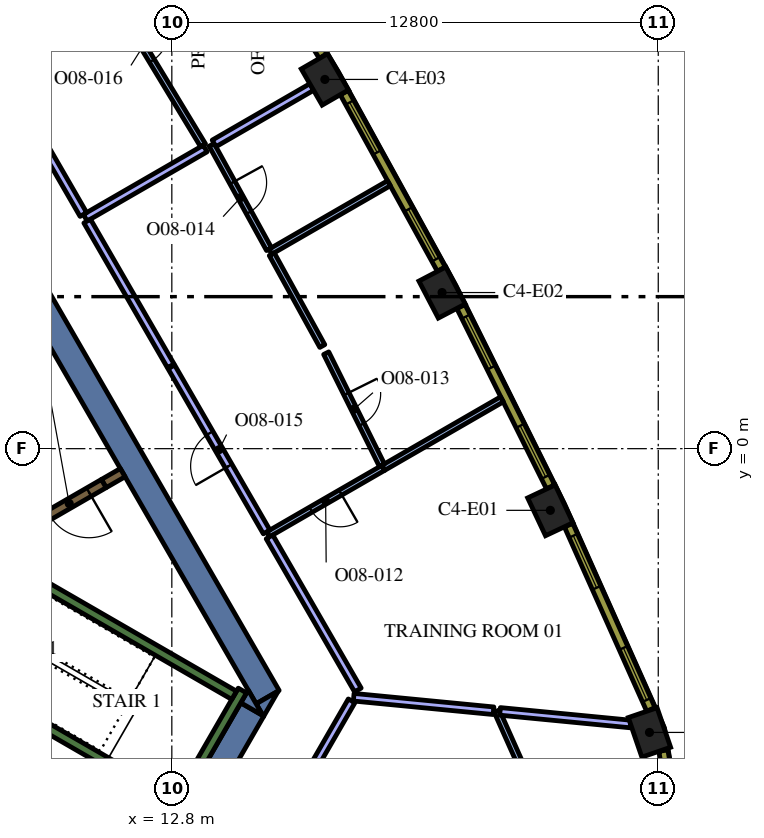
"""IFC4 building model, lengths in metres.
Left out: names, types, materials, properties, quantities, classifications, styles, units other than length and angle.
Written with IfcOpenShell. Run it as: python <this file> out.ifc"""

import sys

from ifc_helpers import new_model, si_unit, direction, frame, frame_2d, origin, origin_2d, place, context, subcontext, project, spatial, polyline, rectangle, outline, extrude, element, fill, save


model = new_model("IFC4")
c1 = context("Model", 3, precision=1e-05, world=origin(), true_north=direction((0.0, 1.0)))
c2 = subcontext(c1, "Body", "Model", "MODEL_VIEW")
j1 = project(units=[si_unit("LENGTHUNIT", "METRE"), si_unit("PLANEANGLEUNIT", "RADIAN")], contexts=[c1])
p1 = place(None, origin())
s1 = spatial("IfcSite", under=j1, at=p1, CompositionType="ELEMENT")
p2 = place(p1, origin())
s2 = spatial("IfcBuilding", under=s1, at=p2, CompositionType="ELEMENT")
p3 = place(p2, frame((0.0, 0.0, 226.8)))
s3 = spatial("IfcBuildingStorey", under=s2, at=p3, CompositionType="ELEMENT", Elevation=226.8)
for number, where, z_axis, x_axis in (
    (1, (25.369, -7.466, 0.0), (0.0, 0.0, 1.0), (-0.324, 0.946, 0.0)),
    (2, (22.76, -1.623, 0.0), (0.0, 0.0, 1.0), (-0.426, 0.905, 0.0)),
    (3, (19.912, 4.108, 0.0), (0.0, 0.0, 1.0), (-0.464, 0.886, 0.0)),
    (4, (16.827, 9.715, 0.0), (0.0, 0.0, 1.0), (-0.5, 0.866, 0.0)),
):
    element("IfcColumn", number, at=place(p3, frame(where, z_axis=z_axis, x_axis=x_axis)), inside=s3, PredefinedType="COLUMN", context=c2, shape_type="SweptSolid", body=[
        extrude(rectangle(XDim=1.1, YDim=0.8, at=origin_2d()), origin(), (0.0, 0.0, 1.0), 4.2),
    ])
p4 = place(p3, frame((9.085, 4.264, 0.0), z_axis=(0.0, 0.0, 1.0), x_axis=(0.499998082512, -0.866026510844, 0.0)))
e5 = element("IfcWall", 5, at=p4, inside=s3, PredefinedType="SOLIDWALL", context=c2, shape_type="SweptSolid", body=[
    extrude(rectangle(XDim=12.472, YDim=0.7, at=frame_2d((6.236, 0.0))), origin(), (0.0, 0.0, 1.0), 4.2),
])
p5 = place(p3, origin())
e6 = element("IfcWall", 6, at=p5, inside=s3, PredefinedType="SOLIDWALL", context=c2, shape_type="SweptSolid", body=[
    extrude(outline(polyline([(15.213, -7.05), (15.019, -6.714), (15.601, -6.378), (15.213, -7.05)])), origin(), (0.0, 0.0, 1.0), 4.2),
])
p6 = place(p3, frame((13.003, -10.179, 0.0), z_axis=(0.0, 0.0, 1.0), x_axis=(0.499972675833, 0.866041178825, 0.0)))
e7 = element("IfcWall", 7, at=p6, inside=s3, PredefinedType="SOLIDWALL", context=c2, shape_type="SweptSolid", body=[
    extrude(rectangle(XDim=3.829, YDim=0.7, at=frame_2d((1.915, 0.0))), origin(), (0.0, 0.0, 1.0), 4.2),
])
e8 = element("IfcWall", 8, at=p5, inside=s3, PredefinedType="SOLIDWALL", context=c2, shape_type="SweptSolid", body=[
    extrude(outline(polyline([(14.809, -6.35), (15.197, -7.022), (14.615, -6.686), (14.809, -6.35)])), origin(), (0.0, 0.0, 1.0), 4.2),
])
p7 = place(p3, frame((12.84, -9.511, 0.0), z_axis=(0.0, 0.0, 1.0), x_axis=(0.500048121057, 0.865997619297, 0.0)))
e9 = element("IfcWall", 9, at=p7, inside=s3, PredefinedType="SOLIDWALL", context=c2, shape_type="SweptSolid", body=[
    extrude(rectangle(XDim=3.634, YDim=0.25, at=frame_2d((1.817, 0.0))), origin(), (0.0, 0.0, 1.0), 4.2),
])
p8 = place(p3, frame((12.84, -9.261, 0.0), z_axis=(0.0, 0.0, 1.0), x_axis=(-0.866013990052, 0.500019768644, 0.0)))
e10 = element("IfcWall", 10, at=p8, inside=s3, PredefinedType="SOLIDWALL", context=c2, shape_type="SweptSolid", body=[
    extrude(rectangle(XDim=6.8, YDim=0.25, at=frame_2d((3.4, 0.0))), origin(), (0.0, 0.0, 1.0), 4.2),
])
p9 = place(p3, frame((8.334, -2.964, 0.0), z_axis=(0.0, 0.0, 1.0), x_axis=(0.866016039709, -0.500016218704, 0.0)))
e11 = element("IfcWall", 11, at=p9, inside=s3, PredefinedType="SOLIDWALL", context=c2, shape_type="SweptSolid", body=[
    extrude(rectangle(XDim=7.05, YDim=0.25, at=frame_2d((3.525, 0.0))), origin(), (0.0, 0.0, 1.0), 4.2),
])
p10 = place(p3, frame((11.507, -0.631, 0.0), z_axis=(0.0, 0.0, 1.0), x_axis=(-0.866093731455, -0.499881634324, 0.0)))
e12 = element("IfcWall", 12, at=p10, inside=s3, PredefinedType="SOLIDWALL", context=c2, shape_type="SweptSolid", body=[
    extrude(rectangle(XDim=0.575, YDim=0.25, at=frame_2d((0.288, 0.0))), origin(), (0.0, 0.0, 1.0), 4.2),
])
p11 = place(p3, frame((11.009, -0.919, 0.0), z_axis=(0.0, 0.0, 1.0), x_axis=(-0.866059744384, -0.49994051562, 0.0)))
e13 = element("IfcWall", 13, at=p11, inside=s3, PredefinedType="SOLIDWALL", context=c2, shape_type="SweptSolid", body=[
    extrude(rectangle(XDim=2.1, YDim=0.25, at=frame_2d((1.05, 0.0))), origin(), (0.0, 0.0, 1.0), 4.2),
])
p12 = place(p11, frame((0.45, 0.0, 0.0)))
e14 = element("IfcOpeningElement", 14, at=p12, cuts=e13, PredefinedType="OPENING", context=c2, shape_type="SweptSolid", body=[
    extrude(rectangle(XDim=1.2, YDim=2.1, at=frame_2d((0.6, 1.05))), frame((0.0, 0.135, 0.0), z_axis=(0.0, -1.0, 0.0), x_axis=(1.0, 0.0, 0.0)), (0.0, 0.0, 1.0), 0.27),
])
p13 = place(p3, frame((21.963, -8.276, 0.0), z_axis=(0.0, 0.0, 1.0), x_axis=(-0.407510458183, 0.913200540118, 0.0)))
e15 = element("IfcWall", 15, at=p13, inside=s3, PredefinedType="PARTITIONING", context=c2, shape_type="SweptSolid", body=[
    extrude(rectangle(XDim=1.502, YDim=0.15, at=frame_2d((0.751, 0.0))), origin(), (0.0, 0.0, 1.0), 3.45),
])
p14 = place(p3, frame((21.437, -6.913, 0.0), z_axis=(0.0, 0.0, 1.0), x_axis=(0.995357015301, -0.096251816042, 0.0)))
e16 = element("IfcWall", 16, at=p14, inside=s3, PredefinedType="PARTITIONING", context=c2, shape_type="SweptSolid", body=[
    extrude(rectangle(XDim=3.45, YDim=0.2, at=frame_2d((1.725, 0.0))), origin(), (0.0, 0.0, 1.0), 3.45),
])
p15 = place(p3, frame((17.586, -6.54, 0.0), z_axis=(0.0, 0.0, 1.0), x_axis=(0.995358181524, -0.096239755158, 0.0)))
e17 = element("IfcWall", 17, at=p15, inside=s3, PredefinedType="PARTITIONING", context=c2, shape_type="SweptSolid", body=[
    extrude(rectangle(XDim=3.696, YDim=0.2, at=frame_2d((1.848, 0.0))), origin(), (0.0, 0.0, 1.0), 3.45),
])
p16 = place(p3, frame((14.362, -12.124, 0.0), z_axis=(0.0, 0.0, 1.0), x_axis=(0.500017005442, 0.866015585465, 0.0)))
e18 = element("IfcWall", 18, at=p16, inside=s3, PredefinedType="PARTITIONING", context=c2, shape_type="SweptSolid", body=[
    extrude(rectangle(XDim=6.338, YDim=0.2, at=frame_2d((3.169, 0.0))), origin(), (0.0, 0.0, 1.0), 3.45),
])
p17 = place(p3, frame((18.36, -0.508, 0.0), z_axis=(0.0, 0.0, 1.0), x_axis=(0.866033589339, 0.499985821935, 0.0)))
e19 = element("IfcWall", 19, at=p17, inside=s3, PredefinedType="PARTITIONING", context=c2, shape_type="SweptSolid", body=[
    extrude(rectangle(XDim=3.611, YDim=0.15, at=frame_2d((1.805, 0.0))), origin(), (0.0, 0.0, 1.0), 3.45),
])
p18 = place(p3, frame((18.367, -0.504, 0.0), z_axis=(0.0, 0.0, 1.0), x_axis=(-0.866056812483, -0.499945594592, 0.0)))
e20 = element("IfcWall", 20, at=p18, inside=s3, PredefinedType="PARTITIONING", context=c2, shape_type="SweptSolid", body=[
    extrude(rectangle(XDim=3.504, YDim=0.15, at=frame_2d((1.752, 0.0))), origin(), (0.0, 0.0, 1.0), 3.45),
])
p19 = place(p18, frame((1.304, 0.0, 0.0)))
e21 = element("IfcOpeningElement", 21, at=p19, cuts=e20, PredefinedType="OPENING", context=c2, shape_type="SweptSolid", body=[
    extrude(rectangle(XDim=0.9, YDim=2.1, at=frame_2d((0.45, 1.05))), frame((0.0, 0.085, 0.0), z_axis=(0.0, -1.0, 0.0), x_axis=(1.0, 0.0, 0.0)), (0.0, 0.0, 1.0), 0.17),
])
p20 = place(p3, frame((17.696, -6.35, 0.0), z_axis=(0.0, 0.0, 1.0), x_axis=(-0.499976825411, 0.866038783226, 0.0)))
e22 = element("IfcWall", 22, at=p20, inside=s3, PredefinedType="PARTITIONING", context=c2, shape_type="SweptSolid", body=[
    extrude(rectangle(XDim=4.653, YDim=0.2, at=frame_2d((2.326, 0.0))), origin(), (0.0, 0.0, 1.0), 3.45),
])
p21 = place(p3, frame((15.394, 5.183, 0.0), z_axis=(0.0, 0.0, 1.0), x_axis=(0.866039935929, 0.499974828743, 0.0)))
e23 = element("IfcWall", 23, at=p21, inside=s3, PredefinedType="PARTITIONING", context=c2, shape_type="SweptSolid", body=[
    extrude(rectangle(XDim=3.601, YDim=0.15, at=frame_2d((1.8, 0.0))), origin(), (0.0, 0.0, 1.0), 3.45),
])
p22 = place(p3, frame((16.863, 2.513, 0.0), z_axis=(0.0, 0.0, 1.0), x_axis=(0.445197589821, -0.895432357031, 0.0)))
e24 = element("IfcWall", 24, at=p22, inside=s3, PredefinedType="PARTITIONING", context=c2, shape_type="SweptSolid", body=[
    extrude(rectangle(XDim=3.296, YDim=0.15, at=frame_2d((1.648, 0.0))), origin(), (0.0, 0.0, 1.0), 3.45),
])
p23 = place(p22, frame((1.196, 0.0, 0.0)))
e25 = element("IfcOpeningElement", 25, at=p23, cuts=e24, PredefinedType="OPENING", context=c2, shape_type="SweptSolid", body=[
    extrude(rectangle(XDim=0.9, YDim=2.1, at=frame_2d((0.45, 1.05))), frame((0.0, 0.085, 0.0), z_axis=(0.0, -1.0, 0.0), x_axis=(1.0, 0.0, 0.0)), (0.0, 0.0, 1.0), 0.17),
])
p24 = place(p3, frame((16.76, 2.7, 0.0), z_axis=(0.0, 0.0, 1.0), x_axis=(-0.481888167687, 0.876232728128, 0.0)))
e26 = element("IfcWall", 26, at=p24, inside=s3, PredefinedType="PARTITIONING", context=c2, shape_type="SweptSolid", body=[
    extrude(rectangle(XDim=2.758, YDim=0.15, at=frame_2d((1.379, 0.0))), origin(), (0.0, 0.0, 1.0), 3.45),
])
p25 = place(p3, frame((13.848, 7.995, 0.0), z_axis=(0.0, 0.0, 1.0), x_axis=(0.481894826099, -0.876229066272, 0.0)))
e27 = element("IfcWall", 27, at=p25, inside=s3, PredefinedType="PARTITIONING", context=c2, shape_type="SweptSolid", body=[
    extrude(rectangle(XDim=3.134, YDim=0.15, at=frame_2d((1.567, 0.0))), origin(), (0.0, 0.0, 1.0), 3.45),
])
p26 = place(p25, frame((1.134, 0.0, 0.0)))
e28 = element("IfcOpeningElement", 28, at=p26, cuts=e27, PredefinedType="OPENING", context=c2, shape_type="SweptSolid", body=[
    extrude(rectangle(XDim=0.9, YDim=2.1, at=frame_2d((0.45, 1.05))), frame((0.0, 0.085, 0.0), z_axis=(0.0, -1.0, 0.0), x_axis=(1.0, 0.0, 0.0)), (0.0, 0.0, 1.0), 0.17),
])
p27 = place(p3, frame((13.913, 8.032, 0.0), z_axis=(0.0, 0.0, 1.0), x_axis=(0.866015594979, 0.500016988964, 0.0)))
e29 = element("IfcWall", 29, at=p27, inside=s3, PredefinedType="PARTITIONING", context=c2, shape_type="SweptSolid", body=[
    extrude(rectangle(XDim=2.966, YDim=0.2, at=frame_2d((1.483, 0.0))), origin(), (0.0, 0.0, 1.0), 3.45),
])
p28 = place(p3, frame((10.522, 6.075, 0.0), z_axis=(0.0, 0.0, 1.0), x_axis=(0.866003708037, 0.500037576254, 0.0)))
e30 = element("IfcWall", 30, at=p28, inside=s3, PredefinedType="PARTITIONING", context=c2, shape_type="SweptSolid", body=[
    extrude(rectangle(XDim=3.644, YDim=0.2, at=frame_2d((1.822, 0.0))), origin(), (0.0, 0.0, 1.0), 3.45),
])
p29 = place(p3, frame((12.772, 2.178, 0.0), z_axis=(0.0, 0.0, 1.0), x_axis=(-0.50001224981, 0.866018331238, 0.0)))
e31 = element("IfcWall", 31, at=p29, inside=s3, PredefinedType="PARTITIONING", context=c2, shape_type="SweptSolid", body=[
    extrude(rectangle(XDim=4.4, YDim=0.2, at=frame_2d((2.2, 0.0))), origin(), (0.0, 0.0, 1.0), 3.45),
])
p30 = place(p3, frame((15.295, -2.191, 0.0), z_axis=(0.0, 0.0, 1.0), x_axis=(-0.500039923732, 0.86600235258, 0.0)))
e32 = element("IfcWall", 32, at=p30, inside=s3, PredefinedType="PARTITIONING", context=c2, shape_type="SweptSolid", body=[
    extrude(rectangle(XDim=5.015, YDim=0.2, at=frame_2d((2.507, 0.0))), origin(), (0.0, 0.0, 1.0), 3.45),
])
p31 = place(p30, frame((2.0, 0.0, 0.0)))
e33 = element("IfcOpeningElement", 33, at=p31, cuts=e32, PredefinedType="OPENING", context=c2, shape_type="SweptSolid", body=[
    extrude(rectangle(XDim=1.0, YDim=2.1, at=frame_2d((0.5, 1.05))), frame((0.0, 0.11, 0.0), z_axis=(0.0, -1.0, 0.0), x_axis=(1.0, 0.0, 0.0)), (0.0, 0.0, 1.0), 0.22),
])
p32 = place(p3, frame((10.439, 13.24, 0.0), z_axis=(0.0, 0.0, 1.0), x_axis=(0.517837859082, -0.855478785068, 0.0)))
e34 = element("IfcWall", 34, at=p32, inside=s3, PredefinedType="PARTITIONING", context=c2, shape_type="SweptSolid", body=[
    extrude(rectangle(XDim=6.148, YDim=0.15, at=frame_2d((3.074, 0.0))), origin(), (0.0, 0.0, 1.0), 3.45),
])
p33 = place(p32, frame((2.648, 0.0, 0.0)))
e35 = element("IfcOpeningElement", 35, at=p33, cuts=e34, PredefinedType="OPENING", context=c2, shape_type="SweptSolid", body=[
    extrude(rectangle(XDim=0.9, YDim=2.1, at=frame_2d((0.45, 1.05))), frame((0.0, 0.085, 0.0), z_axis=(0.0, -1.0, 0.0), x_axis=(1.0, 0.0, 0.0)), (0.0, 0.0, 1.0), 0.17),
])
p34 = place(p3, frame((10.472, 6.162, 0.0), z_axis=(0.0, 0.0, 1.0), x_axis=(-0.499988222896, 0.866032203192, 0.0)))
e36 = element("IfcWall", 36, at=p34, inside=s3, PredefinedType="PARTITIONING", context=c2, shape_type="SweptSolid", body=[
    extrude(rectangle(XDim=4.4, YDim=0.2, at=frame_2d((2.2, 0.0))), origin(), (0.0, 0.0, 1.0), 3.45),
])
p35 = place(p3, frame((26.172, -10.517, 0.0), z_axis=(0.0, 0.0, 1.0), x_axis=(-0.167660055546, 0.985844869021, 0.0)))
e37 = element("IfcWall", 37, at=p35, inside=s3, PredefinedType="SOLIDWALL", context=c2, shape_type="SweptSolid", body=[
    extrude(rectangle(XDim=2.609, YDim=0.24, at=frame_2d((1.305, 0.0))), origin(), (0.0, 0.0, 1.0), 3.95),
])
p36 = place(p35, frame((0.805, 0.0, 0.9)))
e38 = element("IfcOpeningElement", 38, at=p36, cuts=e37, PredefinedType="OPENING", context=c2, shape_type="SweptSolid", body=[
    extrude(rectangle(XDim=1.0, YDim=2.55, at=frame_2d((0.5, 1.275))), frame((0.0, 0.13, 0.0), z_axis=(0.0, -1.0, 0.0), x_axis=(1.0, 0.0, 0.0)), (0.0, 0.0, 1.0), 0.26),
])
p37 = place(p3, frame((25.405, -6.861, 0.0), z_axis=(0.0, 0.0, 1.0), x_axis=(-0.407579651789, 0.913169659728, 0.0)))
e39 = element("IfcWall", 39, at=p37, inside=s3, PredefinedType="SOLIDWALL", context=c2, shape_type="SweptSolid", body=[
    extrude(rectangle(XDim=5.311, YDim=0.24, at=frame_2d((2.655, 0.0))), origin(), (0.0, 0.0, 1.0), 3.95),
])
p38 = place(p37, frame((0.271, 0.0, 0.9)))
e40 = element("IfcOpeningElement", 40, at=p38, cuts=e39, PredefinedType="OPENING", context=c2, shape_type="SweptSolid", body=[
    extrude(rectangle(XDim=1.5, YDim=2.55, at=frame_2d((0.75, 1.275))), frame((0.0, 0.13, 0.0), z_axis=(0.0, -1.0, 0.0), x_axis=(1.0, 0.0, 0.0)), (0.0, 0.0, 1.0), 0.26),
])
p39 = place(p37, frame((3.504, 0.0, 0.9)))
e41 = element("IfcOpeningElement", 41, at=p39, cuts=e39, PredefinedType="OPENING", context=c2, shape_type="SweptSolid", body=[
    extrude(rectangle(XDim=1.5, YDim=2.55, at=frame_2d((0.75, 1.275))), frame((0.0, 0.13, 0.0), z_axis=(0.0, -1.0, 0.0), x_axis=(1.0, 0.0, 0.0)), (0.0, 0.0, 1.0), 0.26),
])
p40 = place(p3, frame((22.766, -1.005, 0.0), z_axis=(0.0, 0.0, 1.0), x_axis=(-0.445129582031, 0.895466166419, 0.0)))
e42 = element("IfcWall", 42, at=p40, inside=s3, PredefinedType="SOLIDWALL", context=c2, shape_type="SweptSolid", body=[
    extrude(rectangle(XDim=5.298, YDim=0.24, at=frame_2d((2.649, 0.0))), origin(), (0.0, 0.0, 1.0), 3.95),
])
p41 = place(p40, frame((0.295, 0.0, 0.9)))
e43 = element("IfcOpeningElement", 43, at=p41, cuts=e42, PredefinedType="OPENING", context=c2, shape_type="SweptSolid", body=[
    extrude(rectangle(XDim=1.5, YDim=2.55, at=frame_2d((0.75, 1.275))), frame((0.0, 0.13, 0.0), z_axis=(0.0, -1.0, 0.0), x_axis=(1.0, 0.0, 0.0)), (0.0, 0.0, 1.0), 0.26),
])
p42 = place(p40, frame((3.504, 0.0, 0.9)))
e44 = element("IfcOpeningElement", 44, at=p42, cuts=e42, PredefinedType="OPENING", context=c2, shape_type="SweptSolid", body=[
    extrude(rectangle(XDim=1.5, YDim=2.55, at=frame_2d((0.75, 1.275))), frame((0.0, 0.13, 0.0), z_axis=(0.0, -1.0, 0.0), x_axis=(1.0, 0.0, 0.0)), (0.0, 0.0, 1.0), 0.26),
])
p43 = place(p3, frame((19.892, 4.725, 0.0), z_axis=(0.0, 0.0, 1.0), x_axis=(-0.481925825015, 0.876212017256, 0.0)))
e45 = element("IfcWall", 45, at=p43, inside=s3, PredefinedType="SOLIDWALL", context=c2, shape_type="SweptSolid", body=[
    extrude(rectangle(XDim=5.299, YDim=0.24, at=frame_2d((2.649, 0.0))), origin(), (0.0, 0.0, 1.0), 3.95),
])
p44 = place(p43, frame((0.295, 0.0, 0.9)))
e46 = element("IfcOpeningElement", 46, at=p44, cuts=e45, PredefinedType="OPENING", context=c2, shape_type="SweptSolid", body=[
    extrude(rectangle(XDim=1.5, YDim=2.55, at=frame_2d((0.75, 1.275))), frame((0.0, 0.13, 0.0), z_axis=(0.0, -1.0, 0.0), x_axis=(1.0, 0.0, 0.0)), (0.0, 0.0, 1.0), 0.26),
])
p45 = place(p43, frame((3.504, 0.0, 0.9)))
e47 = element("IfcOpeningElement", 47, at=p45, cuts=e45, PredefinedType="OPENING", context=c2, shape_type="SweptSolid", body=[
    extrude(rectangle(XDim=1.5, YDim=2.55, at=frame_2d((0.75, 1.275))), frame((0.0, 0.13, 0.0), z_axis=(0.0, -1.0, 0.0), x_axis=(1.0, 0.0, 0.0)), (0.0, 0.0, 1.0), 0.26),
])
p46 = place(p3, frame((16.782, 10.331, 0.0), z_axis=(0.0, 0.0, 1.0), x_axis=(-0.517846166225, 0.855473756538, 0.0)))
e48 = element("IfcWall", 48, at=p46, inside=s3, PredefinedType="SOLIDWALL", context=c2, shape_type="SweptSolid", body=[
    extrude(rectangle(XDim=5.298, YDim=0.24, at=frame_2d((2.649, 0.0))), origin(), (0.0, 0.0, 1.0), 3.95),
])
p47 = place(p46, frame((0.294, 0.0, 0.9)))
e49 = element("IfcOpeningElement", 49, at=p47, cuts=e48, PredefinedType="OPENING", context=c2, shape_type="SweptSolid", body=[
    extrude(rectangle(XDim=1.5, YDim=2.55, at=frame_2d((0.75, 1.275))), frame((0.0, 0.13, 0.0), z_axis=(0.0, -1.0, 0.0), x_axis=(1.0, 0.0, 0.0)), (0.0, 0.0, 1.0), 0.26),
])
p48 = place(p46, frame((3.504, 0.0, 0.9)))
e50 = element("IfcOpeningElement", 50, at=p48, cuts=e48, PredefinedType="OPENING", context=c2, shape_type="SweptSolid", body=[
    extrude(rectangle(XDim=1.5, YDim=2.55, at=frame_2d((0.75, 1.275))), frame((0.0, 0.13, 0.0), z_axis=(0.0, -1.0, 0.0), x_axis=(1.0, 0.0, 0.0)), (0.0, 0.0, 1.0), 0.26),
])
p49 = place(p12, origin())
e51 = element("IfcDoor", 51, at=p49, inside=s3, OperationType="SINGLE_SWING_LEFT", PredefinedType="DOOR", context=c2, shape_type="SweptSolid", body=[
    extrude(rectangle(XDim=1.2, YDim=2.1, at=frame_2d((0.6, 1.05))), frame((0.0, 0.025, 0.0), z_axis=(0.0, -1.0, 0.0), x_axis=(1.0, 0.0, 0.0)), (0.0, 0.0, 1.0), 0.05),
])
fill(e14, e51)
p50 = place(p19, origin())
e52 = element("IfcDoor", 52, at=p50, inside=s3, OperationType="SINGLE_SWING_RIGHT", PredefinedType="DOOR", context=c2, shape_type="SweptSolid", body=[
    extrude(rectangle(XDim=0.9, YDim=2.1, at=frame_2d((0.45, 1.05))), frame((0.0, 0.025, 0.0), z_axis=(0.0, -1.0, 0.0), x_axis=(1.0, 0.0, 0.0)), (0.0, 0.0, 1.0), 0.05),
])
fill(e21, e52)
p51 = place(p23, origin())
e53 = element("IfcDoor", 53, at=p51, inside=s3, OperationType="SINGLE_SWING_LEFT", PredefinedType="DOOR", context=c2, shape_type="SweptSolid", body=[
    extrude(rectangle(XDim=0.9, YDim=2.1, at=frame_2d((0.45, 1.05))), frame((0.0, 0.025, 0.0), z_axis=(0.0, -1.0, 0.0), x_axis=(1.0, 0.0, 0.0)), (0.0, 0.0, 1.0), 0.05),
])
fill(e25, e53)
p52 = place(p26, origin())
e54 = element("IfcDoor", 54, at=p52, inside=s3, OperationType="SINGLE_SWING_RIGHT", PredefinedType="DOOR", context=c2, shape_type="SweptSolid", body=[
    extrude(rectangle(XDim=0.9, YDim=2.1, at=frame_2d((0.45, 1.05))), frame((0.0, 0.025, 0.0), z_axis=(0.0, -1.0, 0.0), x_axis=(1.0, 0.0, 0.0)), (0.0, 0.0, 1.0), 0.05),
])
fill(e28, e54)
p53 = place(p31, origin())
e55 = element("IfcDoor", 55, at=p53, inside=s3, OperationType="SINGLE_SWING_LEFT", PredefinedType="DOOR", context=c2, shape_type="SweptSolid", body=[
    extrude(rectangle(XDim=1.0, YDim=2.1, at=frame_2d((0.5, 1.05))), frame((0.0, 0.025, 0.0), z_axis=(0.0, -1.0, 0.0), x_axis=(1.0, 0.0, 0.0)), (0.0, 0.0, 1.0), 0.05),
])
fill(e33, e55)
p54 = place(p33, origin())
e56 = element("IfcDoor", 56, at=p54, inside=s3, OperationType="SINGLE_SWING_RIGHT", PredefinedType="DOOR", context=c2, shape_type="SweptSolid", body=[
    extrude(rectangle(XDim=0.9, YDim=2.1, at=frame_2d((0.45, 1.05))), frame((0.0, 0.025, 0.0), z_axis=(0.0, -1.0, 0.0), x_axis=(1.0, 0.0, 0.0)), (0.0, 0.0, 1.0), 0.05),
])
fill(e35, e56)
p55 = place(p38, origin())
e57 = element("IfcWindow", 57, at=p55, inside=s3, PartitioningType="SINGLE_PANEL", PredefinedType="WINDOW", context=c2, shape_type="SweptSolid", body=[
    extrude(rectangle(XDim=1.5, YDim=2.55, at=frame_2d((0.75, 1.275))), frame((0.0, 0.04, 0.0), z_axis=(0.0, -1.0, 0.0), x_axis=(1.0, 0.0, 0.0)), (0.0, 0.0, 1.0), 0.06),
])
fill(e40, e57)
p56 = place(p39, origin())
e58 = element("IfcWindow", 58, at=p56, inside=s3, PartitioningType="SINGLE_PANEL", PredefinedType="WINDOW", context=c2, shape_type="SweptSolid", body=[
    extrude(rectangle(XDim=1.5, YDim=2.55, at=frame_2d((0.75, 1.275))), frame((0.0, 0.04, 0.0), z_axis=(0.0, -1.0, 0.0), x_axis=(1.0, 0.0, 0.0)), (0.0, 0.0, 1.0), 0.06),
])
fill(e41, e58)
p57 = place(p41, origin())
e59 = element("IfcWindow", 59, at=p57, inside=s3, PartitioningType="SINGLE_PANEL", PredefinedType="WINDOW", context=c2, shape_type="SweptSolid", body=[
    extrude(rectangle(XDim=1.5, YDim=2.55, at=frame_2d((0.75, 1.275))), frame((0.0, 0.04, 0.0), z_axis=(0.0, -1.0, 0.0), x_axis=(1.0, 0.0, 0.0)), (0.0, 0.0, 1.0), 0.06),
])
fill(e43, e59)
p58 = place(p42, origin())
e60 = element("IfcWindow", 60, at=p58, inside=s3, PartitioningType="SINGLE_PANEL", PredefinedType="WINDOW", context=c2, shape_type="SweptSolid", body=[
    extrude(rectangle(XDim=1.5, YDim=2.55, at=frame_2d((0.75, 1.275))), frame((0.0, 0.04, 0.0), z_axis=(0.0, -1.0, 0.0), x_axis=(1.0, 0.0, 0.0)), (0.0, 0.0, 1.0), 0.06),
])
fill(e44, e60)
p59 = place(p44, origin())
e61 = element("IfcWindow", 61, at=p59, inside=s3, PartitioningType="SINGLE_PANEL", PredefinedType="WINDOW", context=c2, shape_type="SweptSolid", body=[
    extrude(rectangle(XDim=1.5, YDim=2.55, at=frame_2d((0.75, 1.275))), frame((0.0, 0.04, 0.0), z_axis=(0.0, -1.0, 0.0), x_axis=(1.0, 0.0, 0.0)), (0.0, 0.0, 1.0), 0.06),
])
fill(e46, e61)
p60 = place(p45, origin())
e62 = element("IfcWindow", 62, at=p60, inside=s3, PartitioningType="SINGLE_PANEL", PredefinedType="WINDOW", context=c2, shape_type="SweptSolid", body=[
    extrude(rectangle(XDim=1.5, YDim=2.55, at=frame_2d((0.75, 1.275))), frame((0.0, 0.04, 0.0), z_axis=(0.0, -1.0, 0.0), x_axis=(1.0, 0.0, 0.0)), (0.0, 0.0, 1.0), 0.06),
])
fill(e47, e62)
save(model, sys.argv[1])
